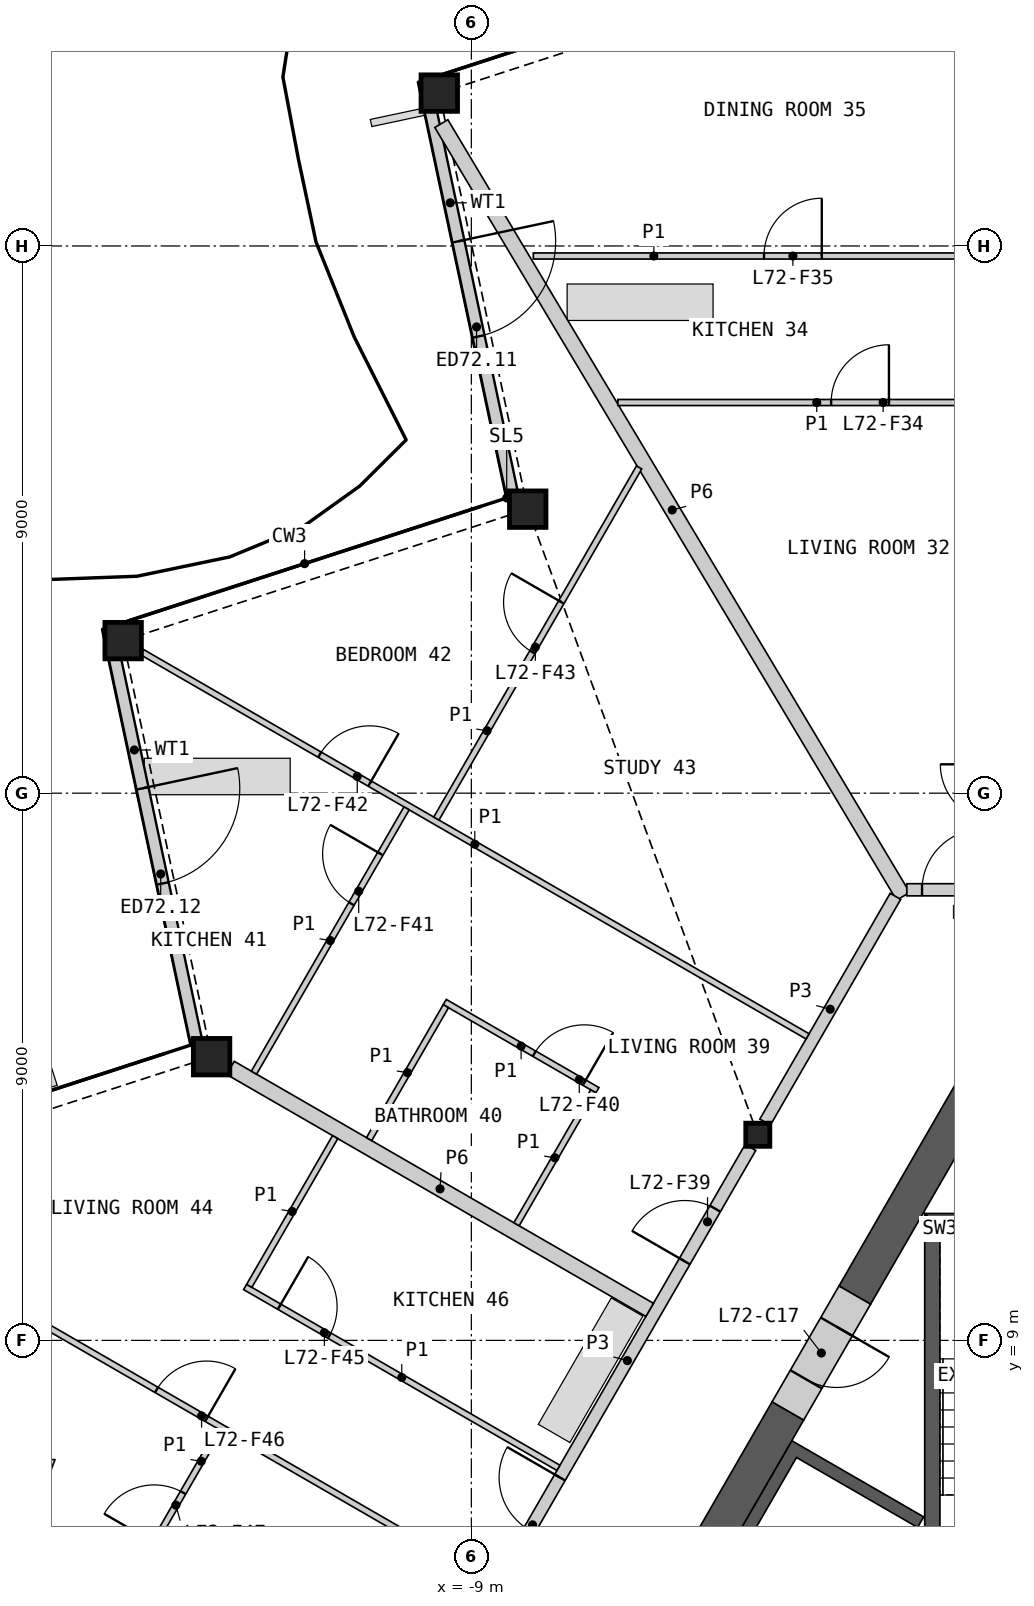
"""IFC4 building model, lengths in metres.
Left out: names, types, materials, properties, quantities, classifications, styles, units other than length and angle.
Written with IfcOpenShell. Run it as: python <this file> out.ifc"""

import sys

from ifc_helpers import new_model, si_unit, direction, frame, frame_2d, origin, origin_2d, place, context, subcontext, project, spatial, polyline, rectangle, hollow_rectangle, i_section, outline, extrude, element, fill, save


model = new_model("IFC4")
c1 = context("Model", 3, precision=1e-05, world=origin(), true_north=direction((0.0, 1.0)))
c2 = subcontext(c1, "Body", "Model", "MODEL_VIEW")
j1 = project(units=[si_unit("LENGTHUNIT", "METRE"), si_unit("PLANEANGLEUNIT", "RADIAN")], contexts=[c1])
p1 = place(None, origin())
s1 = spatial("IfcSite", under=j1, at=p1, CompositionType="ELEMENT")
p2 = place(p1, origin())
s2 = spatial("IfcBuilding", under=s1, at=p2, CompositionType="ELEMENT")
p3 = place(p2, frame((0.0, 0.0, 325.6)))
s3 = spatial("IfcBuildingStorey", under=s2, at=p3, CompositionType="ELEMENT", Elevation=325.6)
for number, where, z_axis, x_axis in (
    (1, (-9.527, 29.514, 0.0), (0.0, 0.0, 1.0), (1.0, 0.0, 0.0)),
    (2, (-8.073, 22.671, 0.0), (0.0, 0.0, 1.0), (1.0, 0.0, 0.0)),
    (3, (-14.727, 20.509, 0.0), (0.0, 0.0, 1.0), (1.0, 0.0, 0.0)),
    (4, (-13.272, 13.666, 0.0), (0.0, 0.0, 1.0), (1.0, 0.0, 0.0)),
):
    element("IfcColumn", number, at=place(p3, frame(where, z_axis=z_axis, x_axis=x_axis)), inside=s3, PredefinedType="COLUMN", context=c2, shape_type="SweptSolid", body=[
        extrude(hollow_rectangle(XDim=0.6, YDim=0.6, WallThickness=0.04, at=origin_2d()), origin(), (0.0, 0.0, 1.0), 3.4),
    ])
p4 = place(p3, frame((-4.289, 12.382, 0.0), z_axis=(0.0, 0.0, 1.0), x_axis=(1.0, 0.0, 0.0)))
e5 = element("IfcColumn", 5, at=p4, inside=s3, PredefinedType="COLUMN", context=c2, shape_type="SweptSolid", body=[
    extrude(i_section(OverallWidth=0.396, OverallDepth=0.381, WebThickness=0.019, FlangeThickness=0.03, at=origin_2d()), origin(), (0.0, 0.0, 1.0), 3.4),
])
p5 = place(p3, frame((-9.684, 29.289, 0.0), z_axis=(0.0, 0.0, 1.0), x_axis=(0.207920686021, -0.978145688701, 0.0)))
e6 = element("IfcWall", 6, at=p5, inside=s3, PredefinedType="SOLIDWALL", context=c2, shape_type="SweptSolid", body=[
    extrude(rectangle(XDim=6.459, YDim=0.2, at=frame_2d((3.229, 0.0))), origin(), (0.0, 0.0, 1.0), 2.488),
])
p6 = place(p5, frame((2.261, 0.0, 0.0)))
e7 = element("IfcOpeningElement", 7, at=p6, cuts=e6, PredefinedType="OPENING", context=c2, shape_type="SweptSolid", body=[
    extrude(rectangle(XDim=1.6, YDim=2.25, at=frame_2d((0.8, 1.125))), frame((0.0, 0.11, 0.0), z_axis=(0.0, -1.0, 0.0), x_axis=(1.0, 0.0, 0.0)), (0.0, 0.0, 1.0), 0.22),
])
p7 = place(p3, frame((-14.878, 20.292, 0.0), z_axis=(0.0, 0.0, 1.0), x_axis=(0.207943189785, -0.978140904892, 0.0)))
e8 = element("IfcWall", 8, at=p7, inside=s3, PredefinedType="SOLIDWALL", context=c2, shape_type="SweptSolid", body=[
    extrude(rectangle(XDim=6.467, YDim=0.2, at=frame_2d((3.233, 0.0))), origin(), (0.0, 0.0, 1.0), 2.488),
])
p8 = place(p7, frame((2.261, 0.0, 0.0)))
e9 = element("IfcOpeningElement", 9, at=p8, cuts=e8, PredefinedType="OPENING", context=c2, shape_type="SweptSolid", body=[
    extrude(rectangle(XDim=1.6, YDim=2.25, at=frame_2d((0.8, 1.125))), frame((0.0, 0.11, 0.0), z_axis=(0.0, -1.0, 0.0), x_axis=(1.0, 0.0, 0.0)), (0.0, 0.0, 1.0), 0.22),
])
p9 = place(p3, origin())
e10 = element("IfcWall", 10, at=p9, inside=s3, PredefinedType="SHEAR", context=c2, shape_type="SweptSolid", body=[
    extrude(outline(polyline([(-4.96, 0.208), (-7.131, 1.461), (-3.731, 7.35), (-1.561, 6.097), (-1.66, 5.924), (-3.652, 7.074), (-6.852, 1.531), (-4.861, 0.381), (-4.96, 0.208)])), origin(), (0.0, 0.0, 1.0), 3.1),
])
p10 = place(p3, origin())
e11 = element("IfcWall", 11, at=p10, inside=s3, PredefinedType="SHEAR", context=c2, shape_type="SweptSolid", body=[
    extrude(outline(polyline([(1.544, 11.087), (-1.544, 11.087), (-1.294, 10.837), (1.294, 10.837), (1.544, 11.087)])), origin(), (0.0, 0.0, 1.0), 3.1),
])
p11 = place(p3, origin())
e12 = element("IfcWall", 12, at=p11, inside=s3, PredefinedType="SHEAR", context=c2, shape_type="SweptSolid", body=[
    extrude(outline(polyline([(-1.294, 10.837), (-1.544, 11.087), (-1.544, 5.237), (-1.294, 5.237), (-1.294, 10.837)])), origin(), (0.0, 0.0, 1.0), 3.1),
])
p12 = place(p3, frame((-3.794, 7.84, 0.0), z_axis=(0.0, 0.0, 1.0), x_axis=(-0.499974747889, -0.866039982607, 0.0)))
e13 = element("IfcWall", 13, at=p12, inside=s3, PredefinedType="SHEAR", context=c2, shape_type="SweptSolid", body=[
    extrude(rectangle(XDim=7.092, YDim=0.6, at=frame_2d((3.546, 0.0))), origin(), (0.0, 0.0, 1.0), 3.1),
])
p13 = place(p3, frame((-0.26, 13.961, 0.0), z_axis=(0.0, 0.0, 1.0), x_axis=(-0.50000604952, -0.866021911064, 0.0)))
e14 = element("IfcWall", 14, at=p13, inside=s3, PredefinedType="SHEAR", context=c2, shape_type="SweptSolid", body=[
    extrude(rectangle(XDim=4.869, YDim=0.6, at=frame_2d((2.434, 0.0))), origin(), (0.0, 0.0, 1.0), 3.1),
])
p14 = place(p3, frame((-2.694, 9.745, 0.0), z_axis=(0.0, 0.0, 1.0), x_axis=(-0.50002983664, -0.866008176907, 0.0)))
e15 = element("IfcWall", 15, at=p14, inside=s3, PredefinedType="SHEAR", context=c2, shape_type="SweptSolid", body=[
    extrude(rectangle(XDim=2.2, YDim=0.6, at=frame_2d((1.1, 0.0))), origin(), (0.0, 0.0, 1.0), 3.1),
])
p15 = place(p14, frame((0.6, 0.0, 0.0)))
e16 = element("IfcOpeningElement", 16, at=p15, cuts=e15, PredefinedType="OPENING", context=c2, shape_type="SweptSolid", body=[
    extrude(rectangle(XDim=1.0, YDim=2.1, at=frame_2d((0.5, 1.05))), frame((0.0, 0.31, 0.0), z_axis=(0.0, -1.0, 0.0), x_axis=(1.0, 0.0, 0.0)), (0.0, 0.0, 1.0), 0.62),
])
p16 = place(p3, frame((-9.493, 29.012, 0.0), z_axis=(0.0, 0.0, 1.0), x_axis=(0.512967150926, -0.85840823742, 0.0)))
e17 = element("IfcWall", 17, at=p16, inside=s3, PredefinedType="PARTITIONING", context=c2, shape_type="SweptSolid", body=[
    extrude(rectangle(XDim=14.805, YDim=0.25, at=frame_2d((7.402, 0.0))), origin(), (0.0, 0.0, 1.0), 2.33),
])
p17 = place(p3, frame((-8.458, 5.16, 0.0), z_axis=(0.0, 0.0, 1.0), x_axis=(0.499984266882, 0.866034487114, 0.0)))
e18 = element("IfcWall", 18, at=p17, inside=s3, PredefinedType="PARTITIONING", context=c2, shape_type="SweptSolid", body=[
    extrude(rectangle(XDim=8.099, YDim=0.2, at=frame_2d((4.049, 0.0))), origin(), (0.0, 0.0, 1.0), 3.1),
])
p18 = place(p17, frame((5.935, 0.0, 0.0)))
e19 = element("IfcOpeningElement", 19, at=p18, cuts=e18, PredefinedType="OPENING", context=c2, shape_type="SweptSolid", body=[
    extrude(rectangle(XDim=1.0, YDim=2.1, at=frame_2d((0.5, 1.05))), frame((0.0, 0.11, 0.0), z_axis=(0.0, -1.0, 0.0), x_axis=(1.0, 0.0, 0.0)), (0.0, 0.0, 1.0), 0.22),
])
p19 = place(p17, frame((0.83, 0.0, 0.0)))
e20 = element("IfcOpeningElement", 20, at=p19, cuts=e18, PredefinedType="OPENING", context=c2, shape_type="SweptSolid", body=[
    extrude(rectangle(XDim=1.0, YDim=2.1, at=frame_2d((0.5, 1.05))), frame((0.0, 0.11, 0.0), z_axis=(0.0, -1.0, 0.0), x_axis=(1.0, 0.0, 0.0)), (0.0, 0.0, 1.0), 0.22),
])
p20 = place(p3, frame((-12.962, 13.482, 0.0), z_axis=(0.0, 0.0, 1.0), x_axis=(0.866022671543, -0.50000473235, 0.0)))
e21 = element("IfcWall", 21, at=p20, inside=s3, PredefinedType="PARTITIONING", context=c2, shape_type="SweptSolid", body=[
    extrude(rectangle(XDim=7.961, YDim=0.25, at=frame_2d((3.98, 0.0))), origin(), (0.0, 0.0, 1.0), 2.33),
])
p21 = place(p3, frame((-4.169, 12.59, 0.0), z_axis=(0.0, 0.0, 1.0), x_axis=(0.499978750566, 0.866037671803, 0.0)))
e22 = element("IfcWall", 22, at=p21, inside=s3, PredefinedType="PARTITIONING", context=c2, shape_type="SweptSolid", body=[
    extrude(rectangle(XDim=4.288, YDim=0.2, at=frame_2d((2.144, 0.0))), origin(), (0.0, 0.0, 1.0), 3.1),
])
p22 = place(p3, frame((-1.838, 16.411, 0.0), z_axis=(0.0, 0.0, 1.0), x_axis=(1.0, 0.0, 0.0)))
e23 = element("IfcWall", 23, at=p22, inside=s3, PredefinedType="PARTITIONING", context=c2, shape_type="SweptSolid", body=[
    extrude(rectangle(XDim=3.676, YDim=0.2, at=frame_2d((1.838, 0.0))), origin(), (0.0, 0.0, 1.0), 3.1),
])
p23 = place(p22, frame((0.25, 0.0, 0.0)))
e24 = element("IfcOpeningElement", 24, at=p23, cuts=e23, PredefinedType="OPENING", context=c2, shape_type="SweptSolid", body=[
    extrude(rectangle(XDim=1.0, YDim=2.1, at=frame_2d((0.5, 1.05))), frame((0.0, 0.11, 0.0), z_axis=(0.0, -1.0, 0.0), x_axis=(1.0, 0.0, 0.0)), (0.0, 0.0, 1.0), 0.22),
])
p24 = place(p3, frame((-14.417, 20.32, 0.0), z_axis=(0.0, 0.0, 1.0), x_axis=(0.866021216079, -0.500007253249, 0.0)))
e25 = element("IfcWall", 25, at=p24, inside=s3, PredefinedType="PARTITIONING", context=c2, shape_type="SweptSolid", body=[
    extrude(rectangle(XDim=12.639, YDim=0.1, at=frame_2d((6.32, 0.0))), origin(), (0.0, 0.0, 1.0), 2.33),
])
p25 = place(p24, frame((3.375, 0.0, 0.0)))
e26 = element("IfcOpeningElement", 26, at=p25, cuts=e25, PredefinedType="OPENING", context=c2, shape_type="SweptSolid", body=[
    extrude(rectangle(XDim=0.95, YDim=2.1, at=frame_2d((0.475, 1.05))), frame((0.0, 0.06, 0.0), z_axis=(0.0, -1.0, 0.0), x_axis=(1.0, 0.0, 0.0)), (0.0, 0.0, 1.0), 0.12),
])
p26 = place(p3, frame((-19.615, 11.325, 0.0), z_axis=(0.0, 0.0, 1.0), x_axis=(0.86602139559, -0.500006942333, 0.0)))
e27 = element("IfcWall", 27, at=p26, inside=s3, PredefinedType="PARTITIONING", context=c2, shape_type="SweptSolid", body=[
    extrude(rectangle(XDim=12.505, YDim=0.1, at=frame_2d((6.252, 0.0))), origin(), (0.0, 0.0, 1.0), 2.33),
])
p27 = place(p26, frame((6.28, 0.0, 0.0)))
e28 = element("IfcOpeningElement", 28, at=p27, cuts=e27, PredefinedType="OPENING", context=c2, shape_type="SweptSolid", body=[
    extrude(rectangle(XDim=0.95, YDim=2.1, at=frame_2d((0.475, 1.05))), frame((0.0, 0.06, 0.0), z_axis=(0.0, -1.0, 0.0), x_axis=(1.0, 0.0, 0.0)), (0.0, 0.0, 1.0), 0.12),
])
p28 = place(p3, frame((-7.981, 26.835, 0.0), z_axis=(0.0, 0.0, 1.0), x_axis=(1.0, 0.0, 0.0)))
e29 = element("IfcWall", 29, at=p28, inside=s3, PredefinedType="PARTITIONING", context=c2, shape_type="SweptSolid", body=[
    extrude(rectangle(XDim=7.931, YDim=0.1, at=frame_2d((3.966, 0.0))), origin(), (0.0, 0.0, 1.0), 2.33),
])
p29 = place(p28, frame((3.794, 0.0, 0.0)))
e30 = element("IfcOpeningElement", 30, at=p29, cuts=e29, PredefinedType="OPENING", context=c2, shape_type="SweptSolid", body=[
    extrude(rectangle(XDim=0.95, YDim=2.1, at=frame_2d((0.475, 1.05))), frame((0.0, 0.06, 0.0), z_axis=(0.0, -1.0, 0.0), x_axis=(1.0, 0.0, 0.0)), (0.0, 0.0, 1.0), 0.12),
])
p30 = place(p3, frame((-9.575, 17.583, 0.0), z_axis=(0.0, 0.0, 1.0), x_axis=(0.499998189891, 0.866026448849, 0.0)))
e31 = element("IfcWall", 31, at=p30, inside=s3, PredefinedType="PARTITIONING", context=c2, shape_type="SweptSolid", body=[
    extrude(rectangle(XDim=6.668, YDim=0.1, at=frame_2d((3.334, 0.0))), origin(), (0.0, 0.0, 1.0), 2.33),
])
p31 = place(p30, frame((3.16, 0.0, 0.0)))
e32 = element("IfcOpeningElement", 32, at=p31, cuts=e31, PredefinedType="OPENING", context=c2, shape_type="SweptSolid", body=[
    extrude(rectangle(XDim=0.95, YDim=2.1, at=frame_2d((0.475, 1.05))), frame((0.0, 0.06, 0.0), z_axis=(0.0, -1.0, 0.0), x_axis=(1.0, 0.0, 0.0)), (0.0, 0.0, 1.0), 0.12),
])
p32 = place(p3, frame((-6.59, 24.425, 0.0), z_axis=(0.0, 0.0, 1.0), x_axis=(1.0, 0.0, 0.0)))
e33 = element("IfcWall", 33, at=p32, inside=s3, PredefinedType="PARTITIONING", context=c2, shape_type="SweptSolid", body=[
    extrude(rectangle(XDim=6.54, YDim=0.1, at=frame_2d((3.27, 0.0))), origin(), (0.0, 0.0, 1.0), 2.33),
])
p33 = place(p32, frame((3.508, 0.0, 0.0)))
e34 = element("IfcOpeningElement", 34, at=p33, cuts=e33, PredefinedType="OPENING", context=c2, shape_type="SweptSolid", body=[
    extrude(rectangle(XDim=0.95, YDim=2.1, at=frame_2d((0.475, 1.05))), frame((0.0, 0.06, 0.0), z_axis=(0.0, -1.0, 0.0), x_axis=(1.0, 0.0, 0.0)), (0.0, 0.0, 1.0), 0.12),
])
p34 = place(p3, frame((-12.721, 9.878, 0.0), z_axis=(0.0, 0.0, 1.0), x_axis=(0.866027751316, -0.499995933934, 0.0)))
e35 = element("IfcWall", 35, at=p34, inside=s3, PredefinedType="PARTITIONING", context=c2, shape_type="SweptSolid", body=[
    extrude(rectangle(XDim=5.95, YDim=0.1, at=frame_2d((2.975, 0.0))), origin(), (0.0, 0.0, 1.0), 2.33),
])
p35 = place(p34, frame((0.65, 0.0, 0.0)))
e36 = element("IfcOpeningElement", 36, at=p35, cuts=e35, PredefinedType="OPENING", context=c2, shape_type="SweptSolid", body=[
    extrude(rectangle(XDim=0.95, YDim=2.1, at=frame_2d((0.475, 1.05))), frame((0.0, 0.06, 0.0), z_axis=(0.0, -1.0, 0.0), x_axis=(1.0, 0.0, 0.0)), (0.0, 0.0, 1.0), 0.12),
])
p36 = place(p3, frame((-12.575, 13.403, 0.0), z_axis=(0.0, 0.0, 1.0), x_axis=(0.499989096993, 0.866031698547, 0.0)))
e37 = element("IfcWall", 37, at=p36, inside=s3, PredefinedType="PARTITIONING", context=c2, shape_type="SweptSolid", body=[
    extrude(rectangle(XDim=5.02, YDim=0.1, at=frame_2d((2.51, 0.0))), origin(), (0.0, 0.0, 1.0), 2.33),
])
p37 = place(p36, frame((3.208, 0.0, 0.0)))
e38 = element("IfcOpeningElement", 38, at=p37, cuts=e37, PredefinedType="OPENING", context=c2, shape_type="SweptSolid", body=[
    extrude(rectangle(XDim=0.95, YDim=2.1, at=frame_2d((0.475, 1.05))), frame((0.0, 0.06, 0.0), z_axis=(0.0, -1.0, 0.0), x_axis=(1.0, 0.0, 0.0)), (0.0, 0.0, 1.0), 0.12),
])
p38 = place(p3, frame((-12.652, 9.897, 0.0), z_axis=(0.0, 0.0, 1.0), x_axis=(0.500024172624, 0.866011447264, 0.0)))
e39 = element("IfcWall", 39, at=p38, inside=s3, PredefinedType="PARTITIONING", context=c2, shape_type="SweptSolid", body=[
    extrude(rectangle(XDim=2.825, YDim=0.1, at=frame_2d((1.413, 0.0))), origin(), (0.0, 0.0, 1.0), 2.33),
])
p39 = place(p3, frame((-9.438, 14.565, 0.0), z_axis=(0.0, 0.0, 1.0), x_axis=(0.866032775405, -0.499987231761, 0.0)))
e40 = element("IfcWall", 40, at=p39, inside=s3, PredefinedType="PARTITIONING", context=c2, shape_type="SweptSolid", body=[
    extrude(rectangle(XDim=2.9, YDim=0.1, at=frame_2d((1.45, 0.0))), origin(), (0.0, 0.0, 1.0), 2.33),
])
p40 = place(p39, frame((1.7, 0.0, 0.0)))
e41 = element("IfcOpeningElement", 41, at=p40, cuts=e40, PredefinedType="OPENING", context=c2, shape_type="SweptSolid", body=[
    extrude(rectangle(XDim=0.95, YDim=2.1, at=frame_2d((0.475, 1.05))), frame((0.0, 0.06, 0.0), z_axis=(0.0, -1.0, 0.0), x_axis=(1.0, 0.0, 0.0)), (0.0, 0.0, 1.0), 0.12),
])
for number, where, z_axis, x_axis in (
    (42, (-10.682, 12.31, 0.0), (0.0, 0.0, 1.0), (0.5, 0.866, 0.0)),
    (43, (-8.257, 10.91, 0.0), (0.0, 0.0, 1.0), (0.5, 0.866, 0.0)),
):
    element("IfcWall", number, at=place(p3, frame(where, z_axis=z_axis, x_axis=x_axis)), inside=s3, PredefinedType="PARTITIONING", context=c2, shape_type="SweptSolid", body=[
        extrude(rectangle(XDim=2.525, YDim=0.1, at=frame_2d((1.262, 0.0))), origin(), (0.0, 0.0, 1.0), 2.33),
    ])
p41 = place(p3, frame((-14.341, 5.457, 0.0), z_axis=(0.0, 0.0, 1.0), x_axis=(0.499954846121, 0.866051471819, 0.0)))
e44 = element("IfcWall", 44, at=p41, inside=s3, PredefinedType="PARTITIONING", context=c2, shape_type="SweptSolid", body=[
    extrude(rectangle(XDim=2.395, YDim=0.1, at=frame_2d((1.197, 0.0))), origin(), (0.0, 0.0, 1.0), 2.33),
])
p42 = place(p41, frame((0.25, 0.0, 0.0)))
e45 = element("IfcOpeningElement", 45, at=p42, cuts=e44, PredefinedType="OPENING", context=c2, shape_type="SweptSolid", body=[
    extrude(rectangle(XDim=0.95, YDim=2.1, at=frame_2d((0.475, 1.05))), frame((0.0, 0.06, 0.0), z_axis=(0.0, -1.0, 0.0), x_axis=(1.0, 0.0, 0.0)), (0.0, 0.0, 1.0), 0.12),
])
p43 = place(p6, origin())
e46 = element("IfcDoor", 46, at=p43, inside=s3, OperationType="DOUBLE_DOOR_SINGLE_SWING", PredefinedType="DOOR", context=c2, shape_type="SweptSolid", body=[
    extrude(rectangle(XDim=1.6, YDim=2.25, at=frame_2d((0.8, 1.125))), frame((0.0, 0.025, 0.0), z_axis=(0.0, -1.0, 0.0), x_axis=(1.0, 0.0, 0.0)), (0.0, 0.0, 1.0), 0.05),
])
fill(e7, e46)
p44 = place(p8, origin())
e47 = element("IfcDoor", 47, at=p44, inside=s3, OperationType="DOUBLE_DOOR_SINGLE_SWING", PredefinedType="DOOR", context=c2, shape_type="SweptSolid", body=[
    extrude(rectangle(XDim=1.6, YDim=2.25, at=frame_2d((0.8, 1.125))), frame((0.0, 0.025, 0.0), z_axis=(0.0, -1.0, 0.0), x_axis=(1.0, 0.0, 0.0)), (0.0, 0.0, 1.0), 0.05),
])
fill(e9, e47)
p45 = place(p15, origin())
e48 = element("IfcDoor", 48, at=p45, inside=s3, OperationType="SINGLE_SWING_LEFT", PredefinedType="DOOR", context=c2, shape_type="SweptSolid", body=[
    extrude(rectangle(XDim=1.0, YDim=2.1, at=frame_2d((0.5, 1.05))), frame((0.0, 0.055, 0.0), z_axis=(0.0, -1.0, 0.0), x_axis=(1.0, 0.0, 0.0)), (0.0, 0.0, 1.0), 0.05),
])
fill(e16, e48)
p46 = place(p23, origin())
e49 = element("IfcDoor", 49, at=p46, inside=s3, OperationType="SINGLE_SWING_RIGHT", PredefinedType="DOOR", context=c2, shape_type="SweptSolid", body=[
    extrude(rectangle(XDim=1.0, YDim=2.1, at=frame_2d((0.5, 1.05))), frame((0.0, 0.025, 0.0), z_axis=(0.0, -1.0, 0.0), x_axis=(1.0, 0.0, 0.0)), (0.0, 0.0, 1.0), 0.05),
])
fill(e24, e49)
p47 = place(p33, origin())
e50 = element("IfcDoor", 50, at=p47, inside=s3, OperationType="SINGLE_SWING_RIGHT", PredefinedType="DOOR", context=c2, shape_type="SweptSolid", body=[
    extrude(rectangle(XDim=0.95, YDim=2.1, at=frame_2d((0.475, 1.05))), frame((0.0, 0.025, 0.0), z_axis=(0.0, -1.0, 0.0), x_axis=(1.0, 0.0, 0.0)), (0.0, 0.0, 1.0), 0.05),
])
fill(e34, e50)
p48 = place(p29, origin())
e51 = element("IfcDoor", 51, at=p48, inside=s3, OperationType="SINGLE_SWING_RIGHT", PredefinedType="DOOR", context=c2, shape_type="SweptSolid", body=[
    extrude(rectangle(XDim=0.95, YDim=2.1, at=frame_2d((0.475, 1.05))), frame((0.0, 0.025, 0.0), z_axis=(0.0, -1.0, 0.0), x_axis=(1.0, 0.0, 0.0)), (0.0, 0.0, 1.0), 0.05),
])
fill(e30, e51)
p49 = place(p18, origin())
e52 = element("IfcDoor", 52, at=p49, inside=s3, OperationType="SINGLE_SWING_LEFT", PredefinedType="DOOR", context=c2, shape_type="SweptSolid", body=[
    extrude(rectangle(XDim=1.0, YDim=2.1, at=frame_2d((0.5, 1.05))), frame((0.0, 0.025, 0.0), z_axis=(0.0, -1.0, 0.0), x_axis=(1.0, 0.0, 0.0)), (0.0, 0.0, 1.0), 0.05),
])
fill(e19, e52)
p50 = place(p40, origin())
e53 = element("IfcDoor", 53, at=p50, inside=s3, OperationType="SINGLE_SWING_RIGHT", PredefinedType="DOOR", context=c2, shape_type="SweptSolid", body=[
    extrude(rectangle(XDim=0.95, YDim=2.1, at=frame_2d((0.475, 1.05))), frame((0.0, 0.025, 0.0), z_axis=(0.0, -1.0, 0.0), x_axis=(1.0, 0.0, 0.0)), (0.0, 0.0, 1.0), 0.05),
])
fill(e41, e53)
p51 = place(p37, origin())
e54 = element("IfcDoor", 54, at=p51, inside=s3, OperationType="SINGLE_SWING_RIGHT", PredefinedType="DOOR", context=c2, shape_type="SweptSolid", body=[
    extrude(rectangle(XDim=0.95, YDim=2.1, at=frame_2d((0.475, 1.05))), frame((0.0, 0.025, 0.0), z_axis=(0.0, -1.0, 0.0), x_axis=(1.0, 0.0, 0.0)), (0.0, 0.0, 1.0), 0.05),
])
fill(e38, e54)
p52 = place(p25, origin())
e55 = element("IfcDoor", 55, at=p52, inside=s3, OperationType="SINGLE_SWING_RIGHT", PredefinedType="DOOR", context=c2, shape_type="SweptSolid", body=[
    extrude(rectangle(XDim=0.95, YDim=2.1, at=frame_2d((0.475, 1.05))), frame((0.0, 0.025, 0.0), z_axis=(0.0, -1.0, 0.0), x_axis=(1.0, 0.0, 0.0)), (0.0, 0.0, 1.0), 0.05),
])
fill(e26, e55)
p53 = place(p31, origin())
e56 = element("IfcDoor", 56, at=p53, inside=s3, OperationType="SINGLE_SWING_RIGHT", PredefinedType="DOOR", context=c2, shape_type="SweptSolid", body=[
    extrude(rectangle(XDim=0.95, YDim=2.1, at=frame_2d((0.475, 1.05))), frame((0.0, 0.025, 0.0), z_axis=(0.0, -1.0, 0.0), x_axis=(1.0, 0.0, 0.0)), (0.0, 0.0, 1.0), 0.05),
])
fill(e32, e56)
p54 = place(p19, origin())
e57 = element("IfcDoor", 57, at=p54, inside=s3, OperationType="SINGLE_SWING_RIGHT", PredefinedType="DOOR", context=c2, shape_type="SweptSolid", body=[
    extrude(rectangle(XDim=1.0, YDim=2.1, at=frame_2d((0.5, 1.05))), frame((0.0, 0.025, 0.0), z_axis=(0.0, -1.0, 0.0), x_axis=(1.0, 0.0, 0.0)), (0.0, 0.0, 1.0), 0.05),
])
fill(e20, e57)
p55 = place(p35, origin())
e58 = element("IfcDoor", 58, at=p55, inside=s3, OperationType="SINGLE_SWING_LEFT", PredefinedType="DOOR", context=c2, shape_type="SweptSolid", body=[
    extrude(rectangle(XDim=0.95, YDim=2.1, at=frame_2d((0.475, 1.05))), frame((0.0, 0.025, 0.0), z_axis=(0.0, -1.0, 0.0), x_axis=(1.0, 0.0, 0.0)), (0.0, 0.0, 1.0), 0.05),
])
fill(e36, e58)
p56 = place(p27, origin())
e59 = element("IfcDoor", 59, at=p56, inside=s3, OperationType="SINGLE_SWING_RIGHT", PredefinedType="DOOR", context=c2, shape_type="SweptSolid", body=[
    extrude(rectangle(XDim=0.95, YDim=2.1, at=frame_2d((0.475, 1.05))), frame((0.0, 0.025, 0.0), z_axis=(0.0, -1.0, 0.0), x_axis=(1.0, 0.0, 0.0)), (0.0, 0.0, 1.0), 0.05),
])
fill(e28, e59)
p57 = place(p42, origin())
e60 = element("IfcDoor", 60, at=p57, inside=s3, OperationType="SINGLE_SWING_LEFT", PredefinedType="DOOR", context=c2, shape_type="SweptSolid", body=[
    extrude(rectangle(XDim=0.95, YDim=2.1, at=frame_2d((0.475, 1.05))), frame((0.0, 0.025, 0.0), z_axis=(0.0, -1.0, 0.0), x_axis=(1.0, 0.0, 0.0)), (0.0, 0.0, 1.0), 0.05),
])
fill(e45, e60)
save(model, sys.argv[1])
